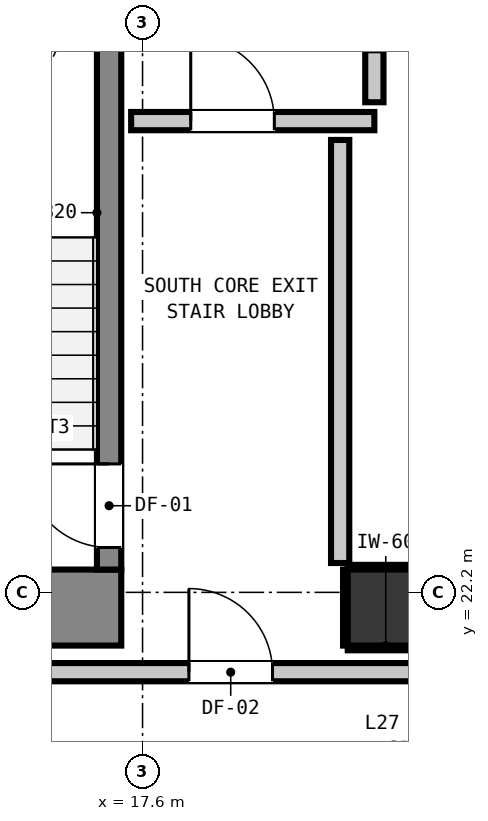
"""IFC4 building model, lengths in metres.
Left out: names, types, materials, properties, quantities, classifications, styles, units other than length and angle.
Written with IfcOpenShell. Run it as: python <this file> out.ifc"""

import sys

from ifc_helpers import new_model, si_unit, direction, frame, frame_2d, origin, origin_2d, place, context, subcontext, project, spatial, rectangle, extrude, element, fill, save


model = new_model("IFC4")
c1 = context("Model", 3, precision=1e-05, world=origin(), true_north=direction((0.0, 1.0)))
c2 = subcontext(c1, "Body", "Model", "MODEL_VIEW")
j1 = project(units=[si_unit("LENGTHUNIT", "METRE"), si_unit("PLANEANGLEUNIT", "RADIAN")], contexts=[c1])
p1 = place(None, origin())
s1 = spatial("IfcSite", under=j1, at=p1, CompositionType="ELEMENT")
p2 = place(p1, origin())
s2 = spatial("IfcBuilding", under=s1, at=p2, CompositionType="ELEMENT")
p3 = place(p2, frame((0.0, 0.0, 96.12)))
s3 = spatial("IfcBuildingStorey", under=s2, at=p3, CompositionType="ELEMENT", Elevation=96.12)
p4 = place(p3, frame((20.8, 22.0, 0.0), z_axis=(0.0, 0.0, 1.0), x_axis=(1.0, 0.0, 0.0)))
e1 = element("IfcColumn", 1, at=p4, inside=s3, PredefinedType="COLUMN", context=c2, shape_type="SweptSolid", body=[
    extrude(rectangle(XDim=1.0, YDim=1.0, at=origin_2d()), origin(), (0.0, 0.0, 1.0), 3.32),
])
p5 = place(p3, frame((13.24, 22.0, 0.0), z_axis=(0.0, 0.0, 1.0), x_axis=(1.0, 0.0, 0.0)))
e2 = element("IfcWall", 2, at=p5, inside=s3, PredefinedType="SHEAR", context=c2, shape_type="SweptSolid", body=[
    extrude(rectangle(XDim=4.08, YDim=1.0, at=frame_2d((2.04, 0.0))), origin(), (0.0, 0.0, 1.0), 3.32),
])
p6 = place(p3, frame((17.16, 22.5, 0.0), z_axis=(0.0, 0.0, 1.0), x_axis=(0.0, 1.0, 0.0)))
e3 = element("IfcWall", 3, at=p6, inside=s3, PredefinedType="SHEAR", context=c2, shape_type="SweptSolid", body=[
    extrude(rectangle(XDim=7.9, YDim=0.32, at=frame_2d((3.95, 0.0))), origin(), (0.0, 0.0, 1.0), 3.32),
])
p7 = place(p6, frame((0.29, 0.0, 0.0)))
e4 = element("IfcOpeningElement", 4, at=p7, cuts=e3, PredefinedType="OPENING", context=c2, shape_type="SweptSolid", body=[
    extrude(rectangle(XDim=1.1, YDim=2.15, at=frame_2d((0.55, 1.075))), frame((0.0, 0.17, 0.0), z_axis=(0.0, -1.0, 0.0), x_axis=(1.0, 0.0, 0.0)), (0.0, 0.0, 1.0), 0.34),
])
p8 = place(p3, frame((12.993, 21.15, 0.0), z_axis=(0.0, 0.0, 1.0), x_axis=(1.0, 0.0, 0.0)))
e5 = element("IfcWall", 5, at=p8, inside=s3, PredefinedType="PARTITIONING", context=c2, shape_type="SweptSolid", body=[
    extrude(rectangle(XDim=30.98, YDim=0.24, at=frame_2d((15.49, 0.0))), origin(), (0.0, 0.0, 1.0), 3.06),
])
p9 = place(p8, frame((5.217, 0.0, 0.0)))
e6 = element("IfcOpeningElement", 6, at=p9, cuts=e5, PredefinedType="OPENING", context=c2, shape_type="SweptSolid", body=[
    extrude(rectangle(XDim=1.1, YDim=2.15, at=frame_2d((0.55, 1.075))), frame((0.0, 0.13, 0.0), z_axis=(0.0, -1.0, 0.0), x_axis=(1.0, 0.0, 0.0)), (0.0, 0.0, 1.0), 0.26),
])
p10 = place(p8, frame((25.057, 0.0, 0.0)))
e7 = element("IfcOpeningElement", 7, at=p10, cuts=e5, PredefinedType="OPENING", context=c2, shape_type="SweptSolid", body=[
    extrude(rectangle(XDim=1.4, YDim=2.15, at=frame_2d((0.7, 1.075))), frame((0.0, 0.13, 0.0), z_axis=(0.0, -1.0, 0.0), x_axis=(1.0, 0.0, 0.0)), (0.0, 0.0, 1.0), 0.26),
])
p11 = place(p3, frame((17.45, 28.4, 0.0), z_axis=(0.0, 0.0, 1.0), x_axis=(1.0, 0.0, 0.0)))
e8 = element("IfcWall", 8, at=p11, inside=s3, PredefinedType="PARTITIONING", context=c2, shape_type="SweptSolid", body=[
    extrude(rectangle(XDim=3.2, YDim=0.24, at=frame_2d((1.6, 0.0))), origin(), (0.0, 0.0, 1.0), 3.06),
])
p12 = place(p11, frame((0.784, 0.0, 0.0)))
e9 = element("IfcOpeningElement", 9, at=p12, cuts=e8, PredefinedType="OPENING", context=c2, shape_type="SweptSolid", body=[
    extrude(rectangle(XDim=1.1, YDim=2.15, at=frame_2d((0.55, 1.075))), frame((0.0, 0.13, 0.0), z_axis=(0.0, -1.0, 0.0), x_axis=(1.0, 0.0, 0.0)), (0.0, 0.0, 1.0), 0.26),
])
p13 = place(p3, frame((20.2, 22.586, 0.0), z_axis=(0.0, 0.0, 1.0), x_axis=(0.0, 1.0, 0.0)))
e10 = element("IfcWall", 10, at=p13, inside=s3, PredefinedType="PARTITIONING", context=c2, shape_type="SweptSolid", body=[
    extrude(rectangle(XDim=5.566, YDim=0.24, at=frame_2d((2.783, 0.0))), origin(), (0.0, 0.0, 1.0), 3.06),
])
p14 = place(p3, frame((20.65, 28.648, 0.0), z_axis=(0.0, 0.0, 1.0), x_axis=(0.0, 1.0, 0.0)))
e11 = element("IfcWall", 11, at=p14, inside=s3, PredefinedType="PARTITIONING", context=c2, shape_type="SweptSolid", body=[
    extrude(rectangle(XDim=0.684, YDim=0.24, at=frame_2d((0.342, 0.0))), origin(), (0.0, 0.0, 1.0), 2.295),
])
for number, where, z_axis, x_axis in (
    (12, (20.3, 21.468, 0.0), (0.0, 0.0, 1.0), (1.0, 0.0, 0.0)),
    (13, (20.3, 22.532, 0.0), (0.0, 0.0, 1.0), (1.0, 0.0, 0.0)),
    (14, (20.268, 21.5, 0.0), (0.0, 0.0, 1.0), (0.0, 1.0, 0.0)),
):
    element("IfcWall", number, at=place(p3, frame(where, z_axis=z_axis, x_axis=x_axis)), inside=s3, PredefinedType="PARTITIONING", context=c2, shape_type="SweptSolid", body=[
        extrude(rectangle(XDim=1.0, YDim=0.06, at=frame_2d((0.5, 0.0))), origin(), (0.0, 0.0, 1.0), 1.45),
    ])
p15 = place(p7, origin())
e15 = element("IfcDoor", 15, at=p15, inside=s3, OperationType="SINGLE_SWING_RIGHT", PredefinedType="DOOR", context=c2, shape_type="SweptSolid", body=[
    extrude(rectangle(XDim=1.1, YDim=2.15, at=frame_2d((0.55, 1.075))), frame((0.0, 0.025, 0.0), z_axis=(0.0, -1.0, 0.0), x_axis=(1.0, 0.0, 0.0)), (0.0, 0.0, 1.0), 0.05),
])
fill(e4, e15)
p16 = place(p12, origin())
e16 = element("IfcDoor", 16, at=p16, inside=s3, OperationType="SINGLE_SWING_LEFT", PredefinedType="DOOR", context=c2, shape_type="SweptSolid", body=[
    extrude(rectangle(XDim=1.1, YDim=2.15, at=frame_2d((0.55, 1.075))), frame((0.0, 0.025, 0.0), z_axis=(0.0, -1.0, 0.0), x_axis=(1.0, 0.0, 0.0)), (0.0, 0.0, 1.0), 0.05),
])
fill(e9, e16)
p17 = place(p9, origin())
e17 = element("IfcDoor", 17, at=p17, inside=s3, OperationType="SINGLE_SWING_LEFT", PredefinedType="DOOR", context=c2, shape_type="SweptSolid", body=[
    extrude(rectangle(XDim=1.1, YDim=2.15, at=frame_2d((0.55, 1.075))), frame((0.0, 0.025, 0.0), z_axis=(0.0, -1.0, 0.0), x_axis=(1.0, 0.0, 0.0)), (0.0, 0.0, 1.0), 0.05),
])
fill(e6, e17)
save(model, sys.argv[1])
